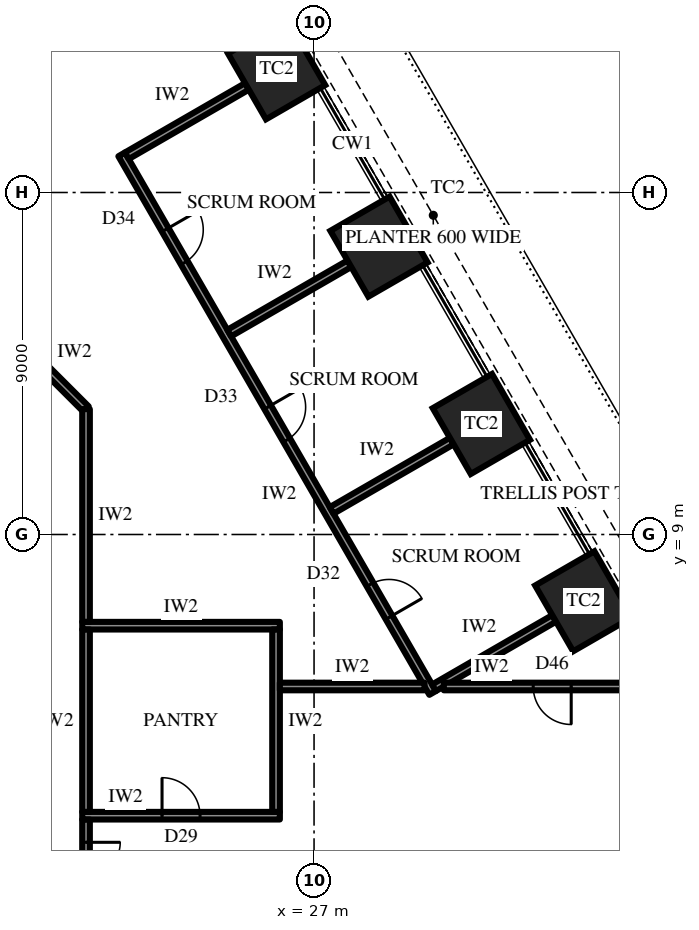
"""IFC4 building model, lengths in metres.
Left out: names, types, materials, properties, quantities, classifications, styles, units other than length and angle.
Written with IfcOpenShell. Run it as: python <this file> out.ifc"""

import sys

from ifc_helpers import new_model, si_unit, direction, frame, frame_2d, origin, origin_2d, place, context, subcontext, project, spatial, rectangle, extrude, element, fill, save


model = new_model("IFC4")
c1 = context("Model", 3, precision=1e-05, world=origin(), true_north=direction((0.0, 1.0)))
c2 = subcontext(c1, "Body", "Model", "MODEL_VIEW")
j1 = project(units=[si_unit("LENGTHUNIT", "METRE"), si_unit("PLANEANGLEUNIT", "RADIAN")], contexts=[c1])
p1 = place(None, origin())
s1 = spatial("IfcSite", under=j1, at=p1, CompositionType="ELEMENT")
p2 = place(p1, origin())
s2 = spatial("IfcBuilding", under=s1, at=p2, CompositionType="ELEMENT")
p3 = place(p2, frame((0.0, 0.0, 48.7)))
s3 = spatial("IfcBuildingStorey", under=s2, at=p3, CompositionType="ELEMENT", Elevation=48.7)
for number, where, z_axis, x_axis in (
    (1, (34.097, 7.242, 0.0), (0.0, 0.0, 1.0), (-0.5, 0.866, 0.0)),
    (2, (31.403, 11.908, 0.0), (0.0, 0.0, 1.0), (-0.5, 0.866, 0.0)),
    (3, (28.709, 16.575, 0.0), (0.0, 0.0, 1.0), (-0.5, 0.866, 0.0)),
    (4, (26.014, 21.242, 0.0), (0.0, 0.0, 1.0), (-0.5, 0.866, 0.0)),
):
    element("IfcColumn", number, at=place(p3, frame(where, z_axis=z_axis, x_axis=x_axis)), inside=s3, PredefinedType="COLUMN", context=c2, shape_type="SweptSolid", body=[
        extrude(rectangle(XDim=2.0, YDim=1.8, at=origin_2d()), origin(), (0.0, 0.0, 1.0), 4.2),
    ])
p4 = place(p3, frame((30.12, 4.83, 0.0), z_axis=(0.0, 0.0, 1.0), x_axis=(-0.500000949028, 0.866024855862, 0.0)))
e5 = element("IfcWall", 5, at=p4, inside=s3, PredefinedType="PARTITIONING", context=c2, shape_type="SweptSolid", body=[
    extrude(rectangle(XDim=16.366, YDim=0.2, at=frame_2d((8.183, 0.0))), origin(), (0.0, 0.0, 1.0), 4.0),
])
p5 = place(p4, frame((2.294, 0.0, 0.0)))
e6 = element("IfcOpeningElement", 6, at=p5, cuts=e5, PredefinedType="OPENING", context=c2, shape_type="SweptSolid", body=[
    extrude(rectangle(XDim=1.0, YDim=2.2, at=frame_2d((0.5, 1.1))), frame((0.0, 0.11, 0.0), z_axis=(0.0, -1.0, 0.0), x_axis=(1.0, 0.0, 0.0)), (0.0, 0.0, 1.0), 0.22),
])
p6 = place(p4, frame((7.683, 0.0, 0.0)))
e7 = element("IfcOpeningElement", 7, at=p6, cuts=e5, PredefinedType="OPENING", context=c2, shape_type="SweptSolid", body=[
    extrude(rectangle(XDim=1.0, YDim=2.2, at=frame_2d((0.5, 1.1))), frame((0.0, 0.11, 0.0), z_axis=(0.0, -1.0, 0.0), x_axis=(1.0, 0.0, 0.0)), (0.0, 0.0, 1.0), 0.22),
])
p7 = place(p4, frame((13.072, 0.0, 0.0)))
e8 = element("IfcOpeningElement", 8, at=p7, cuts=e5, PredefinedType="OPENING", context=c2, shape_type="SweptSolid", body=[
    extrude(rectangle(XDim=1.0, YDim=2.2, at=frame_2d((0.5, 1.1))), frame((0.0, 0.11, 0.0), z_axis=(0.0, -1.0, 0.0), x_axis=(1.0, 0.0, 0.0)), (0.0, 0.0, 1.0), 0.22),
])
for number, where, z_axis, x_axis in (
    (9, (30.157, 4.967, 0.0), (0.0, 0.0, 1.0), (0.866, 0.5, 0.0)),
    (10, (27.463, 9.633, 0.0), (0.0, 0.0, 1.0), (0.866, 0.5, 0.0)),
):
    element("IfcWall", number, at=place(p3, frame(where, z_axis=z_axis, x_axis=x_axis)), inside=s3, PredefinedType="PARTITIONING", context=c2, shape_type="SweptSolid", body=[
        extrude(rectangle(XDim=3.65, YDim=0.2, at=frame_2d((1.825, 0.0))), origin(), (0.0, 0.0, 1.0), 2.944),
    ])
p8 = place(p3, frame((24.768, 14.3, 0.0), z_axis=(0.0, 0.0, 1.0), x_axis=(0.866024069551, 0.500002310952, 0.0)))
e11 = element("IfcWall", 11, at=p8, inside=s3, PredefinedType="PARTITIONING", context=c2, shape_type="SweptSolid", body=[
    extrude(rectangle(XDim=3.65, YDim=0.2, at=frame_2d((1.825, 0.0))), origin(), (0.0, 0.0, 1.0), 4.0),
])
p9 = place(p3, frame((22.074, 18.967, 0.0), z_axis=(0.0, 0.0, 1.0), x_axis=(0.866011828767, 0.500023511883, 0.0)))
e12 = element("IfcWall", 12, at=p9, inside=s3, PredefinedType="PARTITIONING", context=c2, shape_type="SweptSolid", body=[
    extrude(rectangle(XDim=3.65, YDim=0.2, at=frame_2d((1.825, 0.0))), origin(), (0.0, 0.0, 1.0), 2.992),
])
p10 = place(p3, frame((20.9, 1.6, 0.0), z_axis=(0.0, 0.0, 1.0), x_axis=(1.0, 0.0, 0.0)))
e13 = element("IfcWall", 13, at=p10, inside=s3, PredefinedType="PARTITIONING", context=c2, shape_type="SweptSolid", body=[
    extrude(rectangle(XDim=5.2, YDim=0.2, at=frame_2d((2.6, 0.0))), origin(), (0.0, 0.0, 1.0), 4.0),
])
p11 = place(p10, frame((2.1, 0.0, 0.0)))
e14 = element("IfcOpeningElement", 14, at=p11, cuts=e13, PredefinedType="OPENING", context=c2, shape_type="SweptSolid", body=[
    extrude(rectangle(XDim=1.0, YDim=2.2, at=frame_2d((0.5, 1.1))), frame((0.0, 0.11, 0.0), z_axis=(0.0, -1.0, 0.0), x_axis=(1.0, 0.0, 0.0)), (0.0, 0.0, 1.0), 0.22),
])
p12 = place(p3, frame((20.9, 6.6, 0.0), z_axis=(0.0, 0.0, 1.0), x_axis=(1.0, 0.0, 0.0)))
e15 = element("IfcWall", 15, at=p12, inside=s3, PredefinedType="PARTITIONING", context=c2, shape_type="SweptSolid", body=[
    extrude(rectangle(XDim=5.2, YDim=0.2, at=frame_2d((2.6, 0.0))), origin(), (0.0, 0.0, 1.0), 4.0),
])
for number, where, z_axis, x_axis in (
    (16, (21.0, 1.7, 0.0), (0.0, 0.0, 1.0), (0.0, 1.0, 0.0)),
    (17, (26.0, 1.7, 0.0), (0.0, 0.0, 1.0), (0.0, 1.0, 0.0)),
):
    element("IfcWall", number, at=place(p3, frame(where, z_axis=z_axis, x_axis=x_axis)), inside=s3, PredefinedType="PARTITIONING", context=c2, shape_type="SweptSolid", body=[
        extrude(rectangle(XDim=4.8, YDim=0.2, at=frame_2d((2.4, 0.0))), origin(), (0.0, 0.0, 1.0), 4.0),
    ])
p13 = place(p3, frame((19.2, 14.1, 0.0), z_axis=(0.0, 0.0, 1.0), x_axis=(0.707106781187, -0.707106781187, 0.0)))
e18 = element("IfcWall", 18, at=p13, inside=s3, PredefinedType="PARTITIONING", context=c2, shape_type="SweptSolid", body=[
    extrude(rectangle(XDim=2.546, YDim=0.2, at=frame_2d((1.273, 0.0))), origin(), (0.0, 0.0, 1.0), 4.0),
])
p14 = place(p3, frame((21.0, 1.499, 0.0), z_axis=(0.0, 0.0, 1.0), x_axis=(0.0, -1.0, 0.0)))
e19 = element("IfcWall", 19, at=p14, inside=s3, PredefinedType="PARTITIONING", context=c2, shape_type="SweptSolid", body=[
    extrude(rectangle(XDim=2.998, YDim=0.2, at=frame_2d((1.499, 0.0))), origin(), (0.0, 0.0, 1.0), 4.0),
])
p15 = place(p14, frame((0.599, 0.0, 0.0)))
e20 = element("IfcOpeningElement", 20, at=p15, cuts=e19, PredefinedType="OPENING", context=c2, shape_type="SweptSolid", body=[
    extrude(rectangle(XDim=1.8, YDim=2.4, at=frame_2d((0.9, 1.2))), frame((0.0, 0.11, 0.0), z_axis=(0.0, -1.0, 0.0), x_axis=(1.0, 0.0, 0.0)), (0.0, 0.0, 1.0), 0.22),
])
p16 = place(p3, frame((21.0, 12.3, 0.0), z_axis=(0.0, 0.0, 1.0), x_axis=(0.0, -1.0, 0.0)))
e21 = element("IfcWall", 21, at=p16, inside=s3, PredefinedType="PARTITIONING", context=c2, shape_type="SweptSolid", body=[
    extrude(rectangle(XDim=5.599, YDim=0.2, at=frame_2d((2.8, 0.0))), origin(), (0.0, 0.0, 1.0), 4.0),
])
p17 = place(p3, frame((26.1, 5.0, 0.0), z_axis=(0.0, 0.0, 1.0), x_axis=(1.0, 0.0, 0.0)))
e22 = element("IfcWall", 22, at=p17, inside=s3, PredefinedType="PARTITIONING", context=c2, shape_type="SweptSolid", body=[
    extrude(rectangle(XDim=3.807, YDim=0.2, at=frame_2d((1.903, 0.0))), origin(), (0.0, 0.0, 1.0), 4.0),
])
p18 = place(p3, frame((30.415, 5.0, 0.0), z_axis=(0.0, 0.0, 1.0), x_axis=(1.0, 0.0, 0.0)))
e23 = element("IfcWall", 23, at=p18, inside=s3, PredefinedType="PARTITIONING", context=c2, shape_type="SweptSolid", body=[
    extrude(rectangle(XDim=5.704, YDim=0.2, at=frame_2d((2.852, 0.0))), origin(), (0.0, 0.0, 1.0), 4.0),
])
p19 = place(p18, frame((2.352, 0.0, 0.0)))
e24 = element("IfcOpeningElement", 24, at=p19, cuts=e23, PredefinedType="OPENING", context=c2, shape_type="SweptSolid", body=[
    extrude(rectangle(XDim=1.0, YDim=2.2, at=frame_2d((0.5, 1.1))), frame((0.0, 0.11, 0.0), z_axis=(0.0, -1.0, 0.0), x_axis=(1.0, 0.0, 0.0)), (0.0, 0.0, 1.0), 0.22),
])
p20 = place(p5, frame((1.0, 0.0, 0.0), z_axis=(0.0, 0.0, 1.0), x_axis=(-1.0, 0.0, 0.0)))
e25 = element("IfcDoor", 25, at=p20, inside=s3, OperationType="SINGLE_SWING_LEFT", PredefinedType="DOOR", context=c2, shape_type="SweptSolid", body=[
    extrude(rectangle(XDim=1.0, YDim=2.2, at=frame_2d((0.5, 1.1))), frame((0.0, 0.025, 0.0), z_axis=(0.0, -1.0, 0.0), x_axis=(1.0, 0.0, 0.0)), (0.0, 0.0, 1.0), 0.05),
])
fill(e6, e25)
p21 = place(p6, frame((1.0, 0.0, 0.0), z_axis=(0.0, 0.0, 1.0), x_axis=(-1.0, 0.0, 0.0)))
e26 = element("IfcDoor", 26, at=p21, inside=s3, OperationType="SINGLE_SWING_RIGHT", PredefinedType="DOOR", context=c2, shape_type="SweptSolid", body=[
    extrude(rectangle(XDim=1.0, YDim=2.2, at=frame_2d((0.5, 1.1))), frame((0.0, 0.025, 0.0), z_axis=(0.0, -1.0, 0.0), x_axis=(1.0, 0.0, 0.0)), (0.0, 0.0, 1.0), 0.05),
])
fill(e7, e26)
p22 = place(p7, frame((1.0, 0.0, 0.0), z_axis=(0.0, 0.0, 1.0), x_axis=(-1.0, 0.0, 0.0)))
e27 = element("IfcDoor", 27, at=p22, inside=s3, OperationType="SINGLE_SWING_RIGHT", PredefinedType="DOOR", context=c2, shape_type="SweptSolid", body=[
    extrude(rectangle(XDim=1.0, YDim=2.2, at=frame_2d((0.5, 1.1))), frame((0.0, 0.025, 0.0), z_axis=(0.0, -1.0, 0.0), x_axis=(1.0, 0.0, 0.0)), (0.0, 0.0, 1.0), 0.05),
])
fill(e8, e27)
p23 = place(p11, origin())
e28 = element("IfcDoor", 28, at=p23, inside=s3, OperationType="SINGLE_SWING_RIGHT", PredefinedType="DOOR", context=c2, shape_type="SweptSolid", body=[
    extrude(rectangle(XDim=1.0, YDim=2.2, at=frame_2d((0.5, 1.1))), frame((0.0, 0.025, 0.0), z_axis=(0.0, -1.0, 0.0), x_axis=(1.0, 0.0, 0.0)), (0.0, 0.0, 1.0), 0.05),
])
fill(e14, e28)
p24 = place(p15, origin())
e29 = element("IfcDoor", 29, at=p24, inside=s3, OperationType="DOUBLE_DOOR_SINGLE_SWING", PredefinedType="DOOR", context=c2, shape_type="SweptSolid", body=[
    extrude(rectangle(XDim=1.8, YDim=2.4, at=frame_2d((0.9, 1.2))), frame((0.0, 0.025, 0.0), z_axis=(0.0, -1.0, 0.0), x_axis=(1.0, 0.0, 0.0)), (0.0, 0.0, 1.0), 0.05),
])
fill(e20, e29)
p25 = place(p19, frame((1.0, 0.0, 0.0), z_axis=(0.0, 0.0, 1.0), x_axis=(-1.0, 0.0, 0.0)))
e30 = element("IfcDoor", 30, at=p25, inside=s3, OperationType="SINGLE_SWING_RIGHT", PredefinedType="DOOR", context=c2, shape_type="SweptSolid", body=[
    extrude(rectangle(XDim=1.0, YDim=2.2, at=frame_2d((0.5, 1.1))), frame((0.0, 0.025, 0.0), z_axis=(0.0, -1.0, 0.0), x_axis=(1.0, 0.0, 0.0)), (0.0, 0.0, 1.0), 0.05),
])
fill(e24, e30)
save(model, sys.argv[1])
